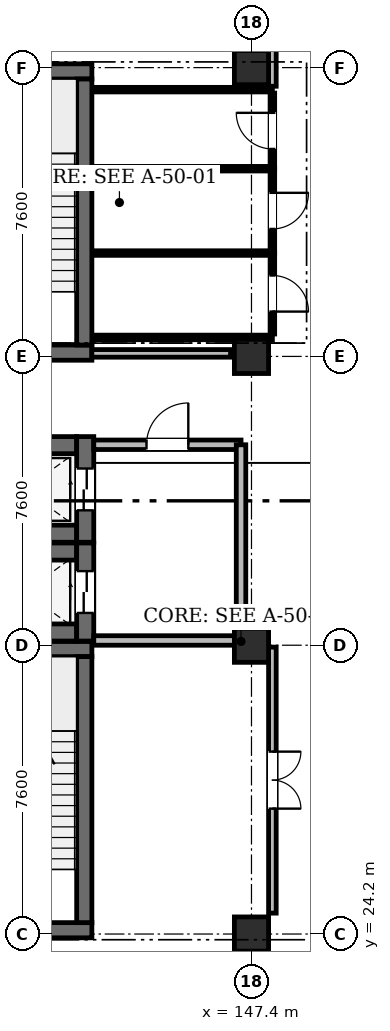
"""IFC4 building model, lengths in metres.
Left out: names, types, materials, properties, quantities, classifications, styles, units other than length and angle.
Written with IfcOpenShell. Run it as: python <this file> out.ifc"""

import sys

from ifc_helpers import new_model, si_unit, direction, frame, frame_2d, origin, origin_2d, place, context, subcontext, project, spatial, rectangle, extrude, element, fill, save


model = new_model("IFC4")
c1 = context("Model", 3, precision=1e-05, world=origin(), true_north=direction((0.0, 1.0)))
c2 = subcontext(c1, "Body", "Model", "MODEL_VIEW")
j1 = project(units=[si_unit("LENGTHUNIT", "METRE"), si_unit("PLANEANGLEUNIT", "RADIAN")], contexts=[c1])
p1 = place(None, origin())
s1 = spatial("IfcSite", under=j1, at=p1, CompositionType="ELEMENT")
p2 = place(p1, origin())
s2 = spatial("IfcBuilding", under=s1, at=p2, CompositionType="ELEMENT")
p3 = place(p2, frame((0.0, 0.0, -4.8)))
s3 = spatial("IfcBuildingStorey", under=s2, at=p3, CompositionType="ELEMENT", Elevation=-4.8)
for number, where, z_axis, x_axis in (
    (1, (147.4, 24.2, 0.0), (0.0, 0.0, 1.0), (1.0, 0.0, 0.0)),
    (2, (147.4, 31.8, 0.0), (0.0, 0.0, 1.0), (1.0, 0.0, 0.0)),
    (3, (147.4, 39.4, 0.0), (0.0, 0.0, 1.0), (1.0, 0.0, 0.0)),
    (4, (147.4, 47.0, 0.0), (0.0, 0.0, 1.0), (1.0, 0.0, 0.0)),
):
    element("IfcColumn", number, at=place(p3, frame(where, z_axis=z_axis, x_axis=x_axis)), inside=s3, PredefinedType="COLUMN", context=c2, shape_type="SweptSolid", body=[
        extrude(rectangle(XDim=0.9, YDim=0.9, at=origin_2d()), origin(), (0.0, 0.0, 1.0), 4.46),
    ])
p4 = place(p3, frame((139.4, 24.3, 0.0), z_axis=(0.0, 0.0, 1.0), x_axis=(1.0, 0.0, 0.0)))
e5 = element("IfcWall", 5, at=p4, inside=s3, PredefinedType="SHEAR", context=c2, shape_type="SweptSolid", body=[
    extrude(rectangle(XDim=3.8, YDim=0.4, at=frame_2d((1.9, 0.0))), origin(), (0.0, 0.0, 1.0), 4.46),
])
p5 = place(p4, frame((1.3, 0.0, 0.0)))
e6 = element("IfcOpeningElement", 6, at=p5, cuts=e5, PredefinedType="OPENING", context=c2, shape_type="SweptSolid", body=[
    extrude(rectangle(XDim=1.2, YDim=2.2, at=frame_2d((0.6, 1.1))), frame((0.0, 0.212, 0.0), z_axis=(0.0, -1.0, 0.0), x_axis=(1.0, 0.0, 0.0)), (0.0, 0.0, 1.0), 0.424),
])
p6 = place(p3, frame((139.4, 31.7, 0.0), z_axis=(0.0, 0.0, 1.0), x_axis=(1.0, 0.0, 0.0)))
e7 = element("IfcWall", 7, at=p6, inside=s3, PredefinedType="SHEAR", context=c2, shape_type="SweptSolid", body=[
    extrude(rectangle(XDim=3.8, YDim=0.4, at=frame_2d((1.9, 0.0))), origin(), (0.0, 0.0, 1.0), 4.46),
])
p7 = place(p3, frame((143.0, 24.5, 0.0), z_axis=(0.0, 0.0, 1.0), x_axis=(0.0, 1.0, 0.0)))
e8 = element("IfcWall", 8, at=p7, inside=s3, PredefinedType="SHEAR", context=c2, shape_type="SweptSolid", body=[
    extrude(rectangle(XDim=7.0, YDim=0.4, at=frame_2d((3.5, 0.0))), origin(), (0.0, 0.0, 1.0), 4.46),
])
p8 = place(p3, frame((139.4, 39.5, 0.0), z_axis=(0.0, 0.0, 1.0), x_axis=(1.0, 0.0, 0.0)))
e9 = element("IfcWall", 9, at=p8, inside=s3, PredefinedType="SHEAR", context=c2, shape_type="SweptSolid", body=[
    extrude(rectangle(XDim=3.8, YDim=0.4, at=frame_2d((1.9, 0.0))), origin(), (0.0, 0.0, 1.0), 4.46),
])
p9 = place(p8, frame((1.3, 0.0, 0.0)))
e10 = element("IfcOpeningElement", 10, at=p9, cuts=e9, PredefinedType="OPENING", context=c2, shape_type="SweptSolid", body=[
    extrude(rectangle(XDim=1.2, YDim=2.2, at=frame_2d((0.6, 1.1))), frame((0.0, 0.212, 0.0), z_axis=(0.0, -1.0, 0.0), x_axis=(1.0, 0.0, 0.0)), (0.0, 0.0, 1.0), 0.424),
])
p10 = place(p3, frame((139.4, 46.9, 0.0), z_axis=(0.0, 0.0, 1.0), x_axis=(1.0, 0.0, 0.0)))
e11 = element("IfcWall", 11, at=p10, inside=s3, PredefinedType="SHEAR", context=c2, shape_type="SweptSolid", body=[
    extrude(rectangle(XDim=3.8, YDim=0.4, at=frame_2d((1.9, 0.0))), origin(), (0.0, 0.0, 1.0), 4.46),
])
p11 = place(p3, frame((143.0, 39.7, 0.0), z_axis=(0.0, 0.0, 1.0), x_axis=(0.0, 1.0, 0.0)))
e12 = element("IfcWall", 12, at=p11, inside=s3, PredefinedType="SHEAR", context=c2, shape_type="SweptSolid", body=[
    extrude(rectangle(XDim=7.0, YDim=0.4, at=frame_2d((3.5, 0.0))), origin(), (0.0, 0.0, 1.0), 4.46),
])
for number, where, z_axis, x_axis in (
    (13, (140.06, 32.135, 0.0), (0.0, 0.0, 1.0), (1.0, 0.0, 0.0)),
    (14, (140.06, 34.265, 0.0), (0.0, 0.0, 1.0), (1.0, 0.0, 0.0)),
):
    element("IfcWall", number, at=place(p3, frame(where, z_axis=z_axis, x_axis=x_axis)), inside=s3, PredefinedType="SHEAR", context=c2, shape_type="SweptSolid", body=[
        extrude(rectangle(XDim=2.74, YDim=0.45, at=frame_2d((1.37, 0.0))), origin(), (0.0, 0.0, 1.0), 4.46),
    ])
p12 = place(p3, frame((143.025, 31.91, 0.0), z_axis=(0.0, 0.0, 1.0), x_axis=(0.0, 1.0, 0.0)))
e15 = element("IfcWall", 15, at=p12, inside=s3, PredefinedType="SHEAR", context=c2, shape_type="SweptSolid", body=[
    extrude(rectangle(XDim=2.58, YDim=0.45, at=frame_2d((1.29, 0.0))), origin(), (0.0, 0.0, 1.0), 4.46),
])
p13 = place(p12, frame((0.74, 0.0, 0.0)))
e16 = element("IfcOpeningElement", 16, at=p13, cuts=e15, PredefinedType="OPENING", context=c2, shape_type="SweptSolid", body=[
    extrude(rectangle(XDim=1.1, YDim=2.2, at=frame_2d((0.55, 1.1))), frame((0.0, 0.237, 0.0), z_axis=(0.0, -1.0, 0.0), x_axis=(1.0, 0.0, 0.0)), (0.0, 0.0, 1.0), 0.474),
])
for number, where, z_axis, x_axis in (
    (17, (140.06, 34.735, 0.0), (0.0, 0.0, 1.0), (1.0, 0.0, 0.0)),
    (18, (140.06, 37.065, 0.0), (0.0, 0.0, 1.0), (1.0, 0.0, 0.0)),
):
    element("IfcWall", number, at=place(p3, frame(where, z_axis=z_axis, x_axis=x_axis)), inside=s3, PredefinedType="SHEAR", context=c2, shape_type="SweptSolid", body=[
        extrude(rectangle(XDim=2.74, YDim=0.45, at=frame_2d((1.37, 0.0))), origin(), (0.0, 0.0, 1.0), 4.46),
    ])
p14 = place(p3, frame((143.025, 34.51, 0.0), z_axis=(0.0, 0.0, 1.0), x_axis=(0.0, 1.0, 0.0)))
e19 = element("IfcWall", 19, at=p14, inside=s3, PredefinedType="SHEAR", context=c2, shape_type="SweptSolid", body=[
    extrude(rectangle(XDim=2.78, YDim=0.45, at=frame_2d((1.39, 0.0))), origin(), (0.0, 0.0, 1.0), 4.46),
])
p15 = place(p14, frame((0.84, 0.0, 0.0)))
e20 = element("IfcOpeningElement", 20, at=p15, cuts=e19, PredefinedType="OPENING", context=c2, shape_type="SweptSolid", body=[
    extrude(rectangle(XDim=1.1, YDim=2.2, at=frame_2d((0.55, 1.1))), frame((0.0, 0.237, 0.0), z_axis=(0.0, -1.0, 0.0), x_axis=(1.0, 0.0, 0.0)), (0.0, 0.0, 1.0), 0.474),
])
p16 = place(p3, frame((143.25, 37.075, 0.0), z_axis=(0.0, 0.0, 1.0), x_axis=(1.0, 0.0, 0.0)))
e21 = element("IfcWall", 21, at=p16, inside=s3, PredefinedType="SOLIDWALL", context=c2, shape_type="SweptSolid", body=[
    extrude(rectangle(XDim=3.875, YDim=0.25, at=frame_2d((1.938, 0.0))), origin(), (0.0, 0.0, 1.0), 4.405),
])
p17 = place(p16, frame((1.387, 0.0, 0.0)))
e22 = element("IfcOpeningElement", 22, at=p17, cuts=e21, PredefinedType="OPENING", context=c2, shape_type="SweptSolid", body=[
    extrude(rectangle(XDim=1.1, YDim=2.2, at=frame_2d((0.55, 1.1))), frame((0.0, 0.137, 0.0), z_axis=(0.0, -1.0, 0.0), x_axis=(1.0, 0.0, 0.0)), (0.0, 0.0, 1.0), 0.274),
])
p18 = place(p3, frame((143.25, 31.925, 0.0), z_axis=(0.0, 0.0, 1.0), x_axis=(1.0, 0.0, 0.0)))
e23 = element("IfcWall", 23, at=p18, inside=s3, PredefinedType="SOLIDWALL", context=c2, shape_type="SweptSolid", body=[
    extrude(rectangle(XDim=3.875, YDim=0.25, at=frame_2d((1.938, 0.0))), origin(), (0.0, 0.0, 1.0), 3.595),
])
p19 = place(p3, frame((147.125, 31.925, 0.0), z_axis=(0.0, 0.0, 1.0), x_axis=(0.0, 1.0, 0.0)))
e24 = element("IfcWall", 24, at=p19, inside=s3, PredefinedType="SOLIDWALL", context=c2, shape_type="SweptSolid", body=[
    extrude(rectangle(XDim=5.15, YDim=0.25, at=frame_2d((2.575, 0.0))), origin(), (0.0, 0.0, 1.0), 3.595),
])
for number, where, z_axis, x_axis in (
    (25, (143.23, 39.9, 0.0), (0.0, 0.0, 1.0), (1.0, 0.0, 0.0)),
    (26, (143.23, 46.42, 0.0), (0.0, 0.0, 1.0), (1.0, 0.0, 0.0)),
):
    element("IfcWall", number, at=place(p3, frame(where, z_axis=z_axis, x_axis=x_axis)), inside=s3, PredefinedType="PARTITIONING", context=c2, shape_type="SweptSolid", body=[
        extrude(rectangle(XDim=4.72, YDim=0.12, at=frame_2d((2.36, 0.0))), origin(), (0.0, 0.0, 1.0), 4.405),
    ])
p20 = place(p3, frame((147.95, 31.75, 0.0), z_axis=(0.0, 0.0, 1.0), x_axis=(0.0, -1.0, 0.0)))
e27 = element("IfcWall", 27, at=p20, inside=s3, PredefinedType="PARTITIONING", context=c2, shape_type="SweptSolid", body=[
    extrude(rectangle(XDim=7.0, YDim=0.2, at=frame_2d((3.5, 0.0))), origin(), (0.0, 0.0, 1.0), 4.405),
])
p21 = place(p20, frame((2.75, 0.0, 0.0)))
e28 = element("IfcOpeningElement", 28, at=p21, cuts=e27, PredefinedType="OPENING", context=c2, shape_type="SweptSolid", body=[
    extrude(rectangle(XDim=1.5, YDim=2.2, at=frame_2d((0.75, 1.1))), frame((0.0, 0.112, 0.0), z_axis=(0.0, -1.0, 0.0), x_axis=(1.0, 0.0, 0.0)), (0.0, 0.0, 1.0), 0.224),
])
p22 = place(p3, frame((143.23, 42.12, 0.0), z_axis=(0.0, 0.0, 1.0), x_axis=(1.0, 0.0, 0.0)))
e29 = element("IfcWall", 29, at=p22, inside=s3, PredefinedType="PARTITIONING", context=c2, shape_type="SweptSolid", body=[
    extrude(rectangle(XDim=4.72, YDim=0.12, at=frame_2d((2.36, 0.0))), origin(), (0.0, 0.0, 1.0), 3.935),
])
p23 = place(p3, frame((147.95, 42.12, 0.0), z_axis=(0.0, 0.0, 1.0), x_axis=(0.0, -1.0, 0.0)))
e30 = element("IfcWall", 30, at=p23, inside=s3, PredefinedType="PARTITIONING", context=c2, shape_type="SweptSolid", body=[
    extrude(rectangle(XDim=2.13, YDim=0.12, at=frame_2d((1.065, 0.0))), origin(), (0.0, 0.0, 1.0), 4.405),
])
p24 = place(p23, frame((0.59, 0.0, 0.0)))
e31 = element("IfcOpeningElement", 31, at=p24, cuts=e30, PredefinedType="OPENING", context=c2, shape_type="SweptSolid", body=[
    extrude(rectangle(XDim=0.95, YDim=2.15, at=frame_2d((0.475, 1.075))), frame((0.0, 0.072, 0.0), z_axis=(0.0, -1.0, 0.0), x_axis=(1.0, 0.0, 0.0)), (0.0, 0.0, 1.0), 0.144),
])
p25 = place(p3, frame((143.23, 44.34, 0.0), z_axis=(0.0, 0.0, 1.0), x_axis=(1.0, 0.0, 0.0)))
e32 = element("IfcWall", 32, at=p25, inside=s3, PredefinedType="PARTITIONING", context=c2, shape_type="SweptSolid", body=[
    extrude(rectangle(XDim=4.72, YDim=0.12, at=frame_2d((2.36, 0.0))), origin(), (0.0, 0.0, 1.0), 3.885),
])
p26 = place(p3, frame((147.95, 44.34, 0.0), z_axis=(0.0, 0.0, 1.0), x_axis=(0.0, -1.0, 0.0)))
e33 = element("IfcWall", 33, at=p26, inside=s3, PredefinedType="PARTITIONING", context=c2, shape_type="SweptSolid", body=[
    extrude(rectangle(XDim=2.22, YDim=0.12, at=frame_2d((1.11, 0.0))), origin(), (0.0, 0.0, 1.0), 4.405),
])
p27 = place(p26, frame((0.635, 0.0, 0.0)))
e34 = element("IfcOpeningElement", 34, at=p27, cuts=e33, PredefinedType="OPENING", context=c2, shape_type="SweptSolid", body=[
    extrude(rectangle(XDim=0.95, YDim=2.15, at=frame_2d((0.475, 1.075))), frame((0.0, 0.072, 0.0), z_axis=(0.0, -1.0, 0.0), x_axis=(1.0, 0.0, 0.0)), (0.0, 0.0, 1.0), 0.144),
])
p28 = place(p3, frame((147.95, 46.33, 0.0), z_axis=(0.0, 0.0, 1.0), x_axis=(0.0, -1.0, 0.0)))
e35 = element("IfcWall", 35, at=p28, inside=s3, PredefinedType="PARTITIONING", context=c2, shape_type="SweptSolid", body=[
    extrude(rectangle(XDim=1.99, YDim=0.12, at=frame_2d((0.995, 0.0))), origin(), (0.0, 0.0, 1.0), 4.405),
])
p29 = place(p28, frame((0.52, 0.0, 0.0)))
e36 = element("IfcOpeningElement", 36, at=p29, cuts=e35, PredefinedType="OPENING", context=c2, shape_type="SweptSolid", body=[
    extrude(rectangle(XDim=0.95, YDim=2.15, at=frame_2d((0.475, 1.075))), frame((0.0, 0.072, 0.0), z_axis=(0.0, -1.0, 0.0), x_axis=(1.0, 0.0, 0.0)), (0.0, 0.0, 1.0), 0.144),
])
p30 = place(p3, frame((143.2, 39.48, 0.0), z_axis=(0.0, 0.0, 1.0), x_axis=(1.0, 0.0, 0.0)))
e37 = element("IfcWall", 37, at=p30, inside=s3, PredefinedType="PARTITIONING", context=c2, shape_type="SweptSolid", body=[
    extrude(rectangle(XDim=3.65, YDim=0.2, at=frame_2d((1.825, 0.0))), origin(), (0.0, 0.0, 1.0), 3.595),
])
p31 = place(p3, frame((147.95, 46.51, 0.0), z_axis=(0.0, 0.0, 1.0), x_axis=(0.0, 1.0, 0.0)))
e38 = element("IfcWall", 38, at=p31, inside=s3, PredefinedType="PARTITIONING", context=c2, shape_type="SweptSolid", body=[
    extrude(rectangle(XDim=19.99, YDim=0.2, at=frame_2d((9.995, 0.0))), origin(), (0.0, 0.0, 1.0), 4.405),
])
p32 = place(p31, frame((9.245, 0.0, 0.0)))
e39 = element("IfcOpeningElement", 39, at=p32, cuts=e38, PredefinedType="OPENING", context=c2, shape_type="SweptSolid", body=[
    extrude(rectangle(XDim=1.5, YDim=2.2, at=frame_2d((0.75, 1.1))), frame((0.0, 0.112, 0.0), z_axis=(0.0, -1.0, 0.0), x_axis=(1.0, 0.0, 0.0)), (0.0, 0.0, 1.0), 0.224),
])
p33 = place(p13, origin())
e40 = element("IfcDoor", 40, at=p33, inside=s3, OperationType="DOUBLE_DOOR_SLIDING", PredefinedType="DOOR", context=c2, shape_type="SweptSolid", body=[
    extrude(rectangle(XDim=1.1, YDim=2.2, at=frame_2d((0.55, 1.1))), frame((0.0, 0.025, 0.0), z_axis=(0.0, -1.0, 0.0), x_axis=(1.0, 0.0, 0.0)), (0.0, 0.0, 1.0), 0.05),
])
fill(e16, e40)
p34 = place(p15, origin())
e41 = element("IfcDoor", 41, at=p34, inside=s3, OperationType="DOUBLE_DOOR_SLIDING", PredefinedType="DOOR", context=c2, shape_type="SweptSolid", body=[
    extrude(rectangle(XDim=1.1, YDim=2.2, at=frame_2d((0.55, 1.1))), frame((0.0, 0.025, 0.0), z_axis=(0.0, -1.0, 0.0), x_axis=(1.0, 0.0, 0.0)), (0.0, 0.0, 1.0), 0.05),
])
fill(e20, e41)
p35 = place(p17, origin())
e42 = element("IfcDoor", 42, at=p35, inside=s3, OperationType="SINGLE_SWING_RIGHT", PredefinedType="DOOR", context=c2, shape_type="SweptSolid", body=[
    extrude(rectangle(XDim=1.1, YDim=2.2, at=frame_2d((0.55, 1.1))), frame((0.0, 0.025, 0.0), z_axis=(0.0, -1.0, 0.0), x_axis=(1.0, 0.0, 0.0)), (0.0, 0.0, 1.0), 0.05),
])
fill(e22, e42)
p36 = place(p21, origin())
e43 = element("IfcDoor", 43, at=p36, inside=s3, OperationType="DOUBLE_DOOR_SINGLE_SWING", PredefinedType="DOOR", context=c2, shape_type="SweptSolid", body=[
    extrude(rectangle(XDim=1.5, YDim=2.2, at=frame_2d((0.75, 1.1))), frame((0.0, 0.025, 0.0), z_axis=(0.0, -1.0, 0.0), x_axis=(1.0, 0.0, 0.0)), (0.0, 0.0, 1.0), 0.05),
])
fill(e28, e43)
p37 = place(p24, origin())
e44 = element("IfcDoor", 44, at=p37, inside=s3, OperationType="SINGLE_SWING_RIGHT", PredefinedType="DOOR", context=c2, shape_type="SweptSolid", body=[
    extrude(rectangle(XDim=0.95, YDim=2.15, at=frame_2d((0.475, 1.075))), frame((0.0, 0.025, 0.0), z_axis=(0.0, -1.0, 0.0), x_axis=(1.0, 0.0, 0.0)), (0.0, 0.0, 1.0), 0.05),
])
fill(e31, e44)
p38 = place(p27, origin())
e45 = element("IfcDoor", 45, at=p38, inside=s3, OperationType="SINGLE_SWING_LEFT", PredefinedType="DOOR", context=c2, shape_type="SweptSolid", body=[
    extrude(rectangle(XDim=0.95, YDim=2.15, at=frame_2d((0.475, 1.075))), frame((0.0, 0.025, 0.0), z_axis=(0.0, -1.0, 0.0), x_axis=(1.0, 0.0, 0.0)), (0.0, 0.0, 1.0), 0.05),
])
fill(e34, e45)
p39 = place(p29, frame((0.95, 0.0, 0.0), z_axis=(0.0, 0.0, 1.0), x_axis=(-1.0, 0.0, 0.0)))
e46 = element("IfcDoor", 46, at=p39, inside=s3, OperationType="SINGLE_SWING_RIGHT", PredefinedType="DOOR", context=c2, shape_type="SweptSolid", body=[
    extrude(rectangle(XDim=0.95, YDim=2.15, at=frame_2d((0.475, 1.075))), frame((0.0, 0.025, 0.0), z_axis=(0.0, -1.0, 0.0), x_axis=(1.0, 0.0, 0.0)), (0.0, 0.0, 1.0), 0.05),
])
fill(e36, e46)
save(model, sys.argv[1])
